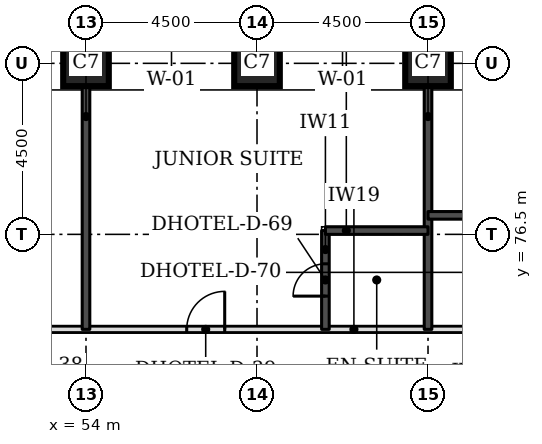
"""IFC4 building model, lengths in metres.
Left out: names, types, materials, properties, quantities, classifications, styles, units other than length and angle.
Written with IfcOpenShell. Run it as: python <this file> out.ifc"""

import sys

from ifc_helpers import new_model, si_unit, direction, frame, frame_2d, origin, origin_2d, place, context, subcontext, project, spatial, rectangle, extrude, element, fill, save


model = new_model("IFC4")
c1 = context("Model", 3, precision=1e-05, world=origin(), true_north=direction((0.0, 1.0)))
c2 = subcontext(c1, "Body", "Model", "MODEL_VIEW")
j1 = project(units=[si_unit("LENGTHUNIT", "METRE"), si_unit("PLANEANGLEUNIT", "RADIAN")], contexts=[c1])
p1 = place(None, origin())
s1 = spatial("IfcSite", under=j1, at=p1, CompositionType="ELEMENT")
p2 = place(p1, origin())
s2 = spatial("IfcBuilding", under=s1, at=p2, CompositionType="ELEMENT")
p3 = place(p2, frame((0.0, 0.0, 59.4)))
s3 = spatial("IfcBuildingStorey", under=s2, at=p3, CompositionType="ELEMENT", Elevation=59.4)
for number, where, z_axis, x_axis in (
    (1, (54.0, 81.0, 0.0), (0.0, 0.0, 1.0), (1.0, 0.0, 0.0)),
    (2, (58.5, 81.0, 0.0), (0.0, 0.0, 1.0), (1.0, 0.0, 0.0)),
    (3, (63.0, 81.0, 0.0), (0.0, 0.0, 1.0), (1.0, 0.0, 0.0)),
):
    element("IfcColumn", number, at=place(p3, frame(where, z_axis=z_axis, x_axis=x_axis)), inside=s3, PredefinedType="COLUMN", context=c2, shape_type="SweptSolid", body=[
        extrude(rectangle(XDim=1.2, YDim=1.2, at=origin_2d()), origin(), (0.0, 0.0, 1.0), 3.3),
    ])
p4 = place(p3, frame((43.0, 74.0, 0.0), z_axis=(0.0, 0.0, 1.0), x_axis=(1.0, 0.0, 0.0)))
e4 = element("IfcWall", 4, at=p4, inside=s3, PredefinedType="PARTITIONING", context=c2, shape_type="SweptSolid", body=[
    extrude(rectangle(XDim=26.5, YDim=0.15, at=frame_2d((13.25, 0.0))), origin(), (0.0, 0.0, 1.0), 3.08),
])
p5 = place(p4, frame((7.6, 0.0, 0.0)))
e5 = element("IfcOpeningElement", 5, at=p5, cuts=e4, PredefinedType="OPENING", context=c2, shape_type="SweptSolid", body=[
    extrude(rectangle(XDim=1.0, YDim=2.1, at=frame_2d((0.5, 1.05))), frame((0.0, 0.085, 0.0), z_axis=(0.0, -1.0, 0.0), x_axis=(1.0, 0.0, 0.0)), (0.0, 0.0, 1.0), 0.17),
])
p6 = place(p4, frame((13.65, 0.0, 0.0)))
e6 = element("IfcOpeningElement", 6, at=p6, cuts=e4, PredefinedType="OPENING", context=c2, shape_type="SweptSolid", body=[
    extrude(rectangle(XDim=1.0, YDim=2.1, at=frame_2d((0.5, 1.05))), frame((0.0, 0.085, 0.0), z_axis=(0.0, -1.0, 0.0), x_axis=(1.0, 0.0, 0.0)), (0.0, 0.0, 1.0), 0.17),
])
p7 = place(p4, frame((23.05, 0.0, 0.0)))
e7 = element("IfcOpeningElement", 7, at=p7, cuts=e4, PredefinedType="OPENING", context=c2, shape_type="SweptSolid", body=[
    extrude(rectangle(XDim=1.0, YDim=2.1, at=frame_2d((0.5, 1.05))), frame((0.0, 0.085, 0.0), z_axis=(0.0, -1.0, 0.0), x_axis=(1.0, 0.0, 0.0)), (0.0, 0.0, 1.0), 0.17),
])
p8 = place(p4, frame((0.5, 0.0, 0.0)))
e8 = element("IfcOpeningElement", 8, at=p8, cuts=e4, PredefinedType="OPENING", context=c2, shape_type="SweptSolid", body=[
    extrude(rectangle(XDim=1.0, YDim=2.1, at=frame_2d((0.5, 1.05))), frame((0.0, 0.085, 0.0), z_axis=(0.0, -1.0, 0.0), x_axis=(1.0, 0.0, 0.0)), (0.0, 0.0, 1.0), 0.17),
])
p9 = place(p4, frame((25.0, 0.0, 0.0)))
e9 = element("IfcOpeningElement", 9, at=p9, cuts=e4, PredefinedType="OPENING", context=c2, shape_type="SweptSolid", body=[
    extrude(rectangle(XDim=1.0, YDim=2.1, at=frame_2d((0.5, 1.05))), frame((0.0, 0.085, 0.0), z_axis=(0.0, -1.0, 0.0), x_axis=(1.0, 0.0, 0.0)), (0.0, 0.0, 1.0), 0.17),
])
p10 = place(p3, frame((54.0, 74.0, 0.0), z_axis=(0.0, 0.0, 1.0), x_axis=(0.0, 1.0, 0.0)))
e10 = element("IfcWall", 10, at=p10, inside=s3, PredefinedType="SOLIDWALL", context=c2, shape_type="SweptSolid", body=[
    extrude(rectangle(XDim=6.4, YDim=0.2, at=frame_2d((3.2, 0.0))), origin(), (0.0, 0.0, 1.0), 3.08),
])
p11 = place(p3, frame((60.3, 74.0, 0.0), z_axis=(0.0, 0.0, 1.0), x_axis=(0.0, 1.0, 0.0)))
e11 = element("IfcWall", 11, at=p11, inside=s3, PredefinedType="SOLIDWALL", context=c2, shape_type="SweptSolid", body=[
    extrude(rectangle(XDim=2.6, YDim=0.2, at=frame_2d((1.3, 0.0))), origin(), (0.0, 0.0, 1.0), 3.08),
])
p12 = place(p11, frame((0.875, 0.0, 0.0)))
e12 = element("IfcOpeningElement", 12, at=p12, cuts=e11, PredefinedType="OPENING", context=c2, shape_type="SweptSolid", body=[
    extrude(rectangle(XDim=0.85, YDim=2.1, at=frame_2d((0.425, 1.05))), frame((0.0, 0.11, 0.0), z_axis=(0.0, -1.0, 0.0), x_axis=(1.0, 0.0, 0.0)), (0.0, 0.0, 1.0), 0.22),
])
p13 = place(p3, frame((63.0, 74.0, 0.0), z_axis=(0.0, 0.0, 1.0), x_axis=(0.0, 1.0, 0.0)))
e13 = element("IfcWall", 13, at=p13, inside=s3, PredefinedType="SOLIDWALL", context=c2, shape_type="SweptSolid", body=[
    extrude(rectangle(XDim=6.4, YDim=0.2, at=frame_2d((3.2, 0.0))), origin(), (0.0, 0.0, 1.0), 3.08),
])
p14 = place(p3, frame((60.3, 76.6, 0.0), z_axis=(0.0, 0.0, 1.0), x_axis=(1.0, 0.0, 0.0)))
e14 = element("IfcWall", 14, at=p14, inside=s3, PredefinedType="SOLIDWALL", context=c2, shape_type="SweptSolid", body=[
    extrude(rectangle(XDim=2.7, YDim=0.2, at=frame_2d((1.35, 0.0))), origin(), (0.0, 0.0, 1.0), 3.08),
])
p15 = place(p3, frame((63.0, 77.0, 0.0), z_axis=(0.0, 0.0, 1.0), x_axis=(1.0, 0.0, 0.0)))
e15 = element("IfcWall", 15, at=p15, inside=s3, PredefinedType="SOLIDWALL", context=c2, shape_type="SweptSolid", body=[
    extrude(rectangle(XDim=2.6, YDim=0.2, at=frame_2d((1.3, 0.0))), origin(), (0.0, 0.0, 1.0), 3.08),
])
p16 = place(p6, origin())
e16 = element("IfcDoor", 16, at=p16, inside=s3, OperationType="SINGLE_SWING_RIGHT", PredefinedType="DOOR", context=c2, shape_type="SweptSolid", body=[
    extrude(rectangle(XDim=1.0, YDim=2.1, at=frame_2d((0.5, 1.05))), frame((0.0, 0.025, 0.0), z_axis=(0.0, -1.0, 0.0), x_axis=(1.0, 0.0, 0.0)), (0.0, 0.0, 1.0), 0.05),
])
fill(e6, e16)
p17 = place(p12, origin())
e17 = element("IfcDoor", 17, at=p17, inside=s3, OperationType="SINGLE_SWING_LEFT", PredefinedType="DOOR", context=c2, shape_type="SweptSolid", body=[
    extrude(rectangle(XDim=0.85, YDim=2.1, at=frame_2d((0.425, 1.05))), frame((0.0, 0.025, 0.0), z_axis=(0.0, -1.0, 0.0), x_axis=(1.0, 0.0, 0.0)), (0.0, 0.0, 1.0), 0.05),
])
fill(e12, e17)
save(model, sys.argv[1])
